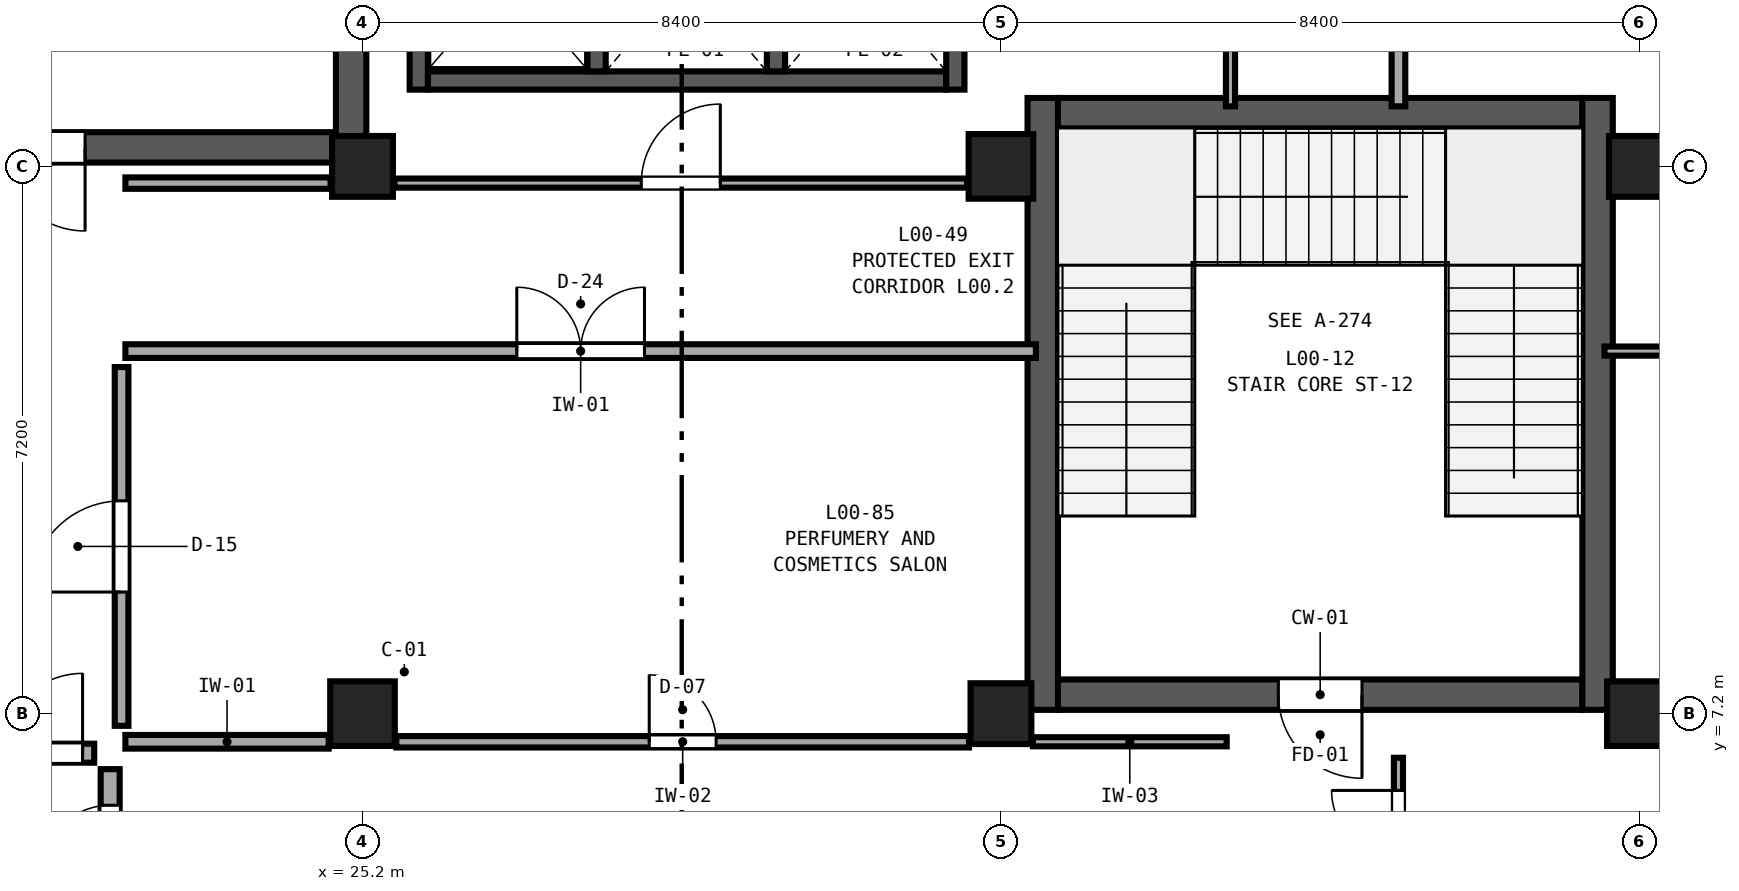
"""IFC4 building model, lengths in metres.
Left out: names, types, materials, properties, quantities, classifications, styles, units other than length and angle.
Written with IfcOpenShell. Run it as: python <this file> out.ifc"""

import sys

from ifc_helpers import new_model, si_unit, direction, frame, frame_2d, origin, origin_2d, place, context, subcontext, project, spatial, rectangle, extrude, element, fill, save


model = new_model("IFC4")
c1 = context("Model", 3, precision=1e-05, world=origin(), true_north=direction((0.0, 1.0)))
c2 = subcontext(c1, "Body", "Model", "MODEL_VIEW")
j1 = project(units=[si_unit("LENGTHUNIT", "METRE"), si_unit("PLANEANGLEUNIT", "RADIAN")], contexts=[c1])
p1 = place(None, origin())
s1 = spatial("IfcSite", under=j1, at=p1, CompositionType="ELEMENT")
p2 = place(p1, origin())
s2 = spatial("IfcBuilding", under=s1, at=p2, CompositionType="ELEMENT")
p3 = place(p2, origin())
s3 = spatial("IfcBuildingStorey", under=s2, at=p3, CompositionType="ELEMENT", Elevation=0.0)
p4 = place(p3, frame((25.2, 7.2, 0.0), z_axis=(0.0, 0.0, 1.0), x_axis=(1.0, 0.0, 0.0)))
e1 = element("IfcColumn", 1, at=p4, inside=s3, PredefinedType="COLUMN", context=c2, shape_type="SweptSolid", body=[
    extrude(rectangle(XDim=0.85, YDim=0.85, at=origin_2d()), origin(), (0.0, 0.0, 1.0), 5.4),
])
for number, where, z_axis, x_axis in (
    (2, (25.2, 14.4, 0.0), (0.0, 0.0, 1.0), (1.0, 0.0, 0.0)),
    (3, (33.6, 7.2, 0.0), (0.0, 0.0, 1.0), (1.0, 0.0, 0.0)),
):
    element("IfcColumn", number, at=place(p3, frame(where, z_axis=z_axis, x_axis=x_axis)), inside=s3, PredefinedType="COLUMN", context=c2, shape_type="SweptSolid", body=[
        extrude(rectangle(XDim=0.8, YDim=0.8, at=origin_2d()), origin(), (0.0, 0.0, 1.0), 5.4),
    ])
for number, where, z_axis, x_axis in (
    (4, (33.6, 14.4, 0.0), (0.0, 0.0, 1.0), (1.0, 0.0, 0.0)),
    (5, (42.0, 7.2, 0.0), (0.0, 0.0, 1.0), (1.0, 0.0, 0.0)),
):
    element("IfcColumn", number, at=place(p3, frame(where, z_axis=z_axis, x_axis=x_axis)), inside=s3, PredefinedType="COLUMN", context=c2, shape_type="SweptSolid", body=[
        extrude(rectangle(XDim=0.85, YDim=0.85, at=origin_2d()), origin(), (0.0, 0.0, 1.0), 5.4),
    ])
p5 = place(p3, frame((42.0, 14.4, 0.0), z_axis=(0.0, 0.0, 1.0), x_axis=(1.0, 0.0, 0.0)))
e6 = element("IfcColumn", 6, at=p5, inside=s3, PredefinedType="COLUMN", context=c2, shape_type="SweptSolid", body=[
    extrude(rectangle(XDim=0.8, YDim=0.8, at=origin_2d()), origin(), (0.0, 0.0, 1.0), 5.4),
])
p6 = place(p3, frame((24.85, 14.65, 0.0), z_axis=(0.0, 0.0, 1.0), x_axis=(-1.0, 0.0, 0.0)))
e7 = element("IfcWall", 7, at=p6, inside=s3, PredefinedType="SHEAR", context=c2, shape_type="SweptSolid", body=[
    extrude(rectangle(XDim=7.7, YDim=0.4, at=frame_2d((3.85, 0.0))), origin(), (0.0, 0.0, 1.0), 5.4),
])
p7 = place(p6, frame((3.3, 0.0, 0.0)))
e8 = element("IfcOpeningElement", 8, at=p7, cuts=e7, PredefinedType="OPENING", context=c2, shape_type="SweptSolid", body=[
    extrude(rectangle(XDim=1.1, YDim=2.2, at=frame_2d((0.55, 1.1))), frame((0.0, 0.22, 0.0), z_axis=(0.0, -1.0, 0.0), x_axis=(1.0, 0.0, 0.0)), (0.0, 0.0, 1.0), 0.44),
])
p8 = place(p3, frame((25.05, 14.45, 0.0), z_axis=(0.0, 0.0, 1.0), x_axis=(0.0, 1.0, 0.0)))
e9 = element("IfcWall", 9, at=p8, inside=s3, PredefinedType="SHEAR", context=c2, shape_type="SweptSolid", body=[
    extrude(rectangle(XDim=8.45, YDim=0.4, at=frame_2d((4.225, 0.0))), origin(), (0.0, 0.0, 1.0), 5.4),
])
p9 = place(p3, frame((41.25, 7.45, 0.0), z_axis=(0.0, 0.0, 1.0), x_axis=(-1.0, 0.0, 0.0)))
e10 = element("IfcWall", 10, at=p9, inside=s3, PredefinedType="SHEAR", context=c2, shape_type="SweptSolid", body=[
    extrude(rectangle(XDim=6.9, YDim=0.4, at=frame_2d((3.45, 0.0))), origin(), (0.0, 0.0, 1.0), 5.4),
])
p10 = place(p9, frame((2.9, 0.0, 0.0)))
e11 = element("IfcOpeningElement", 11, at=p10, cuts=e10, PredefinedType="OPENING", context=c2, shape_type="SweptSolid", body=[
    extrude(rectangle(XDim=1.1, YDim=2.2, at=frame_2d((0.55, 1.1))), frame((0.0, 0.22, 0.0), z_axis=(0.0, -1.0, 0.0), x_axis=(1.0, 0.0, 0.0)), (0.0, 0.0, 1.0), 0.44),
])
p11 = place(p3, frame((34.35, 15.1, 0.0), z_axis=(0.0, 0.0, 1.0), x_axis=(1.0, 0.0, 0.0)))
e12 = element("IfcWall", 12, at=p11, inside=s3, PredefinedType="SHEAR", context=c2, shape_type="SweptSolid", body=[
    extrude(rectangle(XDim=6.9, YDim=0.4, at=frame_2d((3.45, 0.0))), origin(), (0.0, 0.0, 1.0), 5.4),
])
for number, where, z_axis, x_axis in (
    (13, (34.15, 15.3, 0.0), (0.0, 0.0, 1.0), (0.0, -1.0, 0.0)),
    (14, (41.45, 7.25, 0.0), (0.0, 0.0, 1.0), (0.0, 1.0, 0.0)),
):
    element("IfcWall", number, at=place(p3, frame(where, z_axis=z_axis, x_axis=x_axis)), inside=s3, PredefinedType="SHEAR", context=c2, shape_type="SweptSolid", body=[
        extrude(rectangle(XDim=8.05, YDim=0.4, at=frame_2d((4.025, 0.0))), origin(), (0.0, 0.0, 1.0), 5.4),
    ])
p12 = place(p3, frame((26.06, 15.53, 0.0), z_axis=(0.0, 0.0, 1.0), x_axis=(1.0, 0.0, 0.0)))
e15 = element("IfcWall", 15, at=p12, inside=s3, PredefinedType="SHEAR", context=c2, shape_type="SweptSolid", body=[
    extrude(rectangle(XDim=6.82, YDim=0.24, at=frame_2d((3.41, 0.0))), origin(), (0.0, 0.0, 1.0), 5.08),
])
for number, where, z_axis, x_axis in (
    (16, (25.94, 18.39, 0.0), (0.0, 0.0, 1.0), (0.0, -1.0, 0.0)),
    (17, (33.0, 15.41, 0.0), (0.0, 0.0, 1.0), (0.0, 1.0, 0.0)),
):
    element("IfcWall", number, at=place(p3, frame(where, z_axis=z_axis, x_axis=x_axis)), inside=s3, PredefinedType="SHEAR", context=c2, shape_type="SweptSolid", body=[
        extrude(rectangle(XDim=2.98, YDim=0.24, at=frame_2d((1.49, 0.0))), origin(), (0.0, 0.0, 1.0), 5.08),
    ])
for number, where, z_axis, x_axis in (
    (18, (28.28, 15.65, 0.0), (0.0, 0.0, 1.0), (0.0, 1.0, 0.0)),
    (19, (30.64, 15.65, 0.0), (0.0, 0.0, 1.0), (0.0, 1.0, 0.0)),
):
    element("IfcWall", number, at=place(p3, frame(where, z_axis=z_axis, x_axis=x_axis)), inside=s3, PredefinedType="SHEAR", context=c2, shape_type="SweptSolid", body=[
        extrude(rectangle(XDim=2.5, YDim=0.24, at=frame_2d((1.25, 0.0))), origin(), (0.0, 0.0, 1.0), 5.08),
    ])
p13 = place(p3, frame((41.54, 11.97, 0.0), z_axis=(0.0, 0.0, 1.0), x_axis=(1.0, 0.0, 0.0)))
e20 = element("IfcWall", 20, at=p13, inside=s3, PredefinedType="PARTITIONING", context=c2, shape_type="SweptSolid", body=[
    extrude(rectangle(XDim=14.67, YDim=0.12, at=frame_2d((7.335, 0.0))), origin(), (0.0, 0.0, 1.0), 5.08),
])
p14 = place(p13, frame((5.725, 0.0, 0.0)))
e21 = element("IfcOpeningElement", 21, at=p14, cuts=e20, PredefinedType="OPENING", context=c2, shape_type="SweptSolid", body=[
    extrude(rectangle(XDim=1.04, YDim=2.05, at=frame_2d((0.52, 1.025))), frame((0.0, 0.08, 0.0), z_axis=(0.0, -1.0, 0.0), x_axis=(1.0, 0.0, 0.0)), (0.0, 0.0, 1.0), 0.16),
])
p15 = place(p3, frame((22.08, 6.83, 0.0), z_axis=(0.0, 0.0, 1.0), x_axis=(1.0, 0.0, 0.0)))
e22 = element("IfcWall", 22, at=p15, inside=s3, PredefinedType="PARTITIONING", context=c2, shape_type="SweptSolid", body=[
    extrude(rectangle(XDim=2.675, YDim=0.18, at=frame_2d((1.337, 0.0))), origin(), (0.0, 0.0, 1.0), 4.58),
])
p16 = place(p3, frame((25.645, 6.83, 0.0), z_axis=(0.0, 0.0, 1.0), x_axis=(1.0, 0.0, 0.0)))
e23 = element("IfcWall", 23, at=p16, inside=s3, PredefinedType="PARTITIONING", context=c2, shape_type="SweptSolid", body=[
    extrude(rectangle(XDim=7.535, YDim=0.15, at=frame_2d((3.768, 0.0))), origin(), (0.0, 0.0, 1.0), 4.58),
])
p17 = place(p16, frame((3.327, 0.0, 0.0)))
e24 = element("IfcOpeningElement", 24, at=p17, cuts=e23, PredefinedType="OPENING", context=c2, shape_type="SweptSolid", body=[
    extrude(rectangle(XDim=0.88, YDim=2.13, at=frame_2d((0.44, 1.065))), frame((0.0, 0.095, 0.0), z_axis=(0.0, -1.0, 0.0), x_axis=(1.0, 0.0, 0.0)), (0.0, 0.0, 1.0), 0.19),
])
p18 = place(p3, frame((34.02, 6.83, 0.0), z_axis=(0.0, 0.0, 1.0), x_axis=(1.0, 0.0, 0.0)))
e25 = element("IfcWall", 25, at=p18, inside=s3, PredefinedType="PARTITIONING", context=c2, shape_type="SweptSolid", body=[
    extrude(rectangle(XDim=2.55, YDim=0.12, at=frame_2d((1.275, 0.0))), origin(), (0.0, 0.0, 1.0), 4.58),
])
p19 = place(p3, frame((22.08, 11.97, 0.0), z_axis=(0.0, 0.0, 1.0), x_axis=(1.0, 0.0, 0.0)))
e26 = element("IfcWall", 26, at=p19, inside=s3, PredefinedType="PARTITIONING", context=c2, shape_type="SweptSolid", body=[
    extrude(rectangle(XDim=11.98, YDim=0.18, at=frame_2d((5.99, 0.0))), origin(), (0.0, 0.0, 1.0), 5.08),
])
p20 = place(p19, frame((5.15, 0.0, 0.0)))
e27 = element("IfcOpeningElement", 27, at=p20, cuts=e26, PredefinedType="OPENING", context=c2, shape_type="SweptSolid", body=[
    extrude(rectangle(XDim=1.68, YDim=2.29, at=frame_2d((0.84, 1.145))), frame((0.0, 0.11, 0.0), z_axis=(0.0, -1.0, 0.0), x_axis=(1.0, 0.0, 0.0)), (0.0, 0.0, 1.0), 0.22),
])
p21 = place(p3, frame((22.08, 14.18, 0.0), z_axis=(0.0, 0.0, 1.0), x_axis=(1.0, 0.0, 0.0)))
e28 = element("IfcWall", 28, at=p21, inside=s3, PredefinedType="PARTITIONING", context=c2, shape_type="SweptSolid", body=[
    extrude(rectangle(XDim=2.7, YDim=0.15, at=frame_2d((1.35, 0.0))), origin(), (0.0, 0.0, 1.0), 4.58),
])
p22 = place(p3, frame((25.62, 14.18, 0.0), z_axis=(0.0, 0.0, 1.0), x_axis=(1.0, 0.0, 0.0)))
e29 = element("IfcWall", 29, at=p22, inside=s3, PredefinedType="PARTITIONING", context=c2, shape_type="SweptSolid", body=[
    extrude(rectangle(XDim=7.535, YDim=0.12, at=frame_2d((3.768, 0.0))), origin(), (0.0, 0.0, 1.0), 4.58),
])
p23 = place(p22, frame((3.248, 0.0, 0.0)))
e30 = element("IfcOpeningElement", 30, at=p23, cuts=e29, PredefinedType="OPENING", context=c2, shape_type="SweptSolid", body=[
    extrude(rectangle(XDim=1.04, YDim=2.37, at=frame_2d((0.52, 1.185))), frame((0.0, 0.08, 0.0), z_axis=(0.0, -1.0, 0.0), x_axis=(1.0, 0.0, 0.0)), (0.0, 0.0, 1.0), 0.16),
])
p24 = place(p3, frame((22.03, 7.04, 0.0), z_axis=(0.0, 0.0, 1.0), x_axis=(0.0, 1.0, 0.0)))
e31 = element("IfcWall", 31, at=p24, inside=s3, PredefinedType="PARTITIONING", context=c2, shape_type="SweptSolid", body=[
    extrude(rectangle(XDim=4.72, YDim=0.18, at=frame_2d((2.36, 0.0))), origin(), (0.0, 0.0, 1.0), 5.08),
])
p25 = place(p24, frame((1.76, 0.0, 0.0)))
e32 = element("IfcOpeningElement", 32, at=p25, cuts=e31, PredefinedType="OPENING", context=c2, shape_type="SweptSolid", body=[
    extrude(rectangle(XDim=1.2, YDim=2.21, at=frame_2d((0.6, 1.105))), frame((0.0, 0.11, 0.0), z_axis=(0.0, -1.0, 0.0), x_axis=(1.0, 0.0, 0.0)), (0.0, 0.0, 1.0), 0.22),
])
p26 = place(p3, frame((38.83, 15.19, 0.0), z_axis=(0.0, 0.0, 1.0), x_axis=(0.0, 1.0, 0.0)))
e33 = element("IfcWall", 33, at=p26, inside=s3, PredefinedType="PARTITIONING", context=c2, shape_type="SweptSolid", body=[
    extrude(rectangle(XDim=3.43, YDim=0.18, at=frame_2d((1.715, 0.0))), origin(), (0.0, 0.0, 1.0), 5.08),
])
p27 = place(p26, frame((1.155, 0.0, 0.0)))
e34 = element("IfcOpeningElement", 34, at=p27, cuts=e33, PredefinedType="OPENING", context=c2, shape_type="SweptSolid", body=[
    extrude(rectangle(XDim=1.68, YDim=2.37, at=frame_2d((0.84, 1.185))), frame((0.0, 0.11, 0.0), z_axis=(0.0, -1.0, 0.0), x_axis=(1.0, 0.0, 0.0)), (0.0, 0.0, 1.0), 0.22),
])
p28 = place(p3, frame((36.62, 15.19, 0.0), z_axis=(0.0, 0.0, 1.0), x_axis=(0.0, 1.0, 0.0)))
e35 = element("IfcWall", 35, at=p28, inside=s3, PredefinedType="PARTITIONING", context=c2, shape_type="SweptSolid", body=[
    extrude(rectangle(XDim=3.27, YDim=0.12, at=frame_2d((1.635, 0.0))), origin(), (0.0, 0.0, 1.0), 5.08),
])
p29 = place(p28, frame((1.155, 0.0, 0.0)))
e36 = element("IfcOpeningElement", 36, at=p29, cuts=e35, PredefinedType="OPENING", context=c2, shape_type="SweptSolid", body=[
    extrude(rectangle(XDim=1.52, YDim=2.45, at=frame_2d((0.76, 1.225))), frame((0.0, 0.08, 0.0), z_axis=(0.0, -1.0, 0.0), x_axis=(1.0, 0.0, 0.0)), (0.0, 0.0, 1.0), 0.16),
])
p30 = place(p3, frame((19.77, 6.68, 0.0), z_axis=(0.0, 0.0, 1.0), x_axis=(1.0, 0.0, 0.0)))
e37 = element("IfcWall", 37, at=p30, inside=s3, PredefinedType="SOLIDWALL", context=c2, shape_type="SweptSolid", body=[
    extrude(rectangle(XDim=1.9, YDim=0.25, at=frame_2d((0.95, 0.0))), origin(), (0.0, 0.0, 1.0), 4.58),
])
p31 = place(p30, frame((0.697, 0.0, 0.0)))
e38 = element("IfcOpeningElement", 38, at=p31, cuts=e37, PredefinedType="OPENING", context=c2, shape_type="SweptSolid", body=[
    extrude(rectangle(XDim=1.05, YDim=2.15, at=frame_2d((0.525, 1.075))), frame((0.0, 0.145, 0.0), z_axis=(0.0, -1.0, 0.0), x_axis=(1.0, 0.0, 0.0)), (0.0, 0.0, 1.0), 0.29),
])
p32 = place(p3, frame((21.88, 4.62, 0.0), z_axis=(0.0, 0.0, 1.0), x_axis=(0.0, 1.0, 0.0)))
e39 = element("IfcWall", 39, at=p32, inside=s3, PredefinedType="SOLIDWALL", context=c2, shape_type="SweptSolid", body=[
    extrude(rectangle(XDim=1.85, YDim=0.25, at=frame_2d((0.925, 0.0))), origin(), (0.0, 0.0, 1.0), 5.08),
])
p33 = place(p32, frame((0.475, 0.0, 0.0)))
e40 = element("IfcOpeningElement", 40, at=p33, cuts=e39, PredefinedType="OPENING", context=c2, shape_type="SweptSolid", body=[
    extrude(rectangle(XDim=0.9, YDim=2.1, at=frame_2d((0.45, 1.05))), frame((0.0, 0.145, 0.0), z_axis=(0.0, -1.0, 0.0), x_axis=(1.0, 0.0, 0.0)), (0.0, 0.0, 1.0), 0.29),
])
p34 = place(p3, frame((38.83, 4.88, 0.0), z_axis=(0.0, 0.0, 1.0), x_axis=(0.0, 1.0, 0.0)))
e41 = element("IfcWall", 41, at=p34, inside=s3, PredefinedType="PARTITIONING", context=c2, shape_type="SweptSolid", body=[
    extrude(rectangle(XDim=1.74, YDim=0.12, at=frame_2d((0.87, 0.0))), origin(), (0.0, 0.0, 1.0), 5.08),
])
p35 = place(p34, frame((0.43, 0.0, 0.0)))
e42 = element("IfcOpeningElement", 42, at=p35, cuts=e41, PredefinedType="OPENING", context=c2, shape_type="SweptSolid", body=[
    extrude(rectangle(XDim=0.88, YDim=2.05, at=frame_2d((0.44, 1.025))), frame((0.0, 0.08, 0.0), z_axis=(0.0, -1.0, 0.0), x_axis=(1.0, 0.0, 0.0)), (0.0, 0.0, 1.0), 0.16),
])
p36 = place(p7, origin())
e43 = element("IfcDoor", 43, at=p36, inside=s3, OperationType="SINGLE_SWING_LEFT", PredefinedType="DOOR", context=c2, shape_type="SweptSolid", body=[
    extrude(rectangle(XDim=1.1, YDim=2.2, at=frame_2d((0.55, 1.1))), frame((0.0, 0.025, 0.0), z_axis=(0.0, -1.0, 0.0), x_axis=(1.0, 0.0, 0.0)), (0.0, 0.0, 1.0), 0.05),
])
fill(e8, e43)
p37 = place(p10, origin())
e44 = element("IfcDoor", 44, at=p37, inside=s3, OperationType="SINGLE_SWING_LEFT", PredefinedType="DOOR", context=c2, shape_type="SweptSolid", body=[
    extrude(rectangle(XDim=1.1, YDim=2.2, at=frame_2d((0.55, 1.1))), frame((0.0, 0.025, 0.0), z_axis=(0.0, -1.0, 0.0), x_axis=(1.0, 0.0, 0.0)), (0.0, 0.0, 1.0), 0.05),
])
fill(e11, e44)
p38 = place(p17, origin())
e45 = element("IfcDoor", 45, at=p38, inside=s3, OperationType="SINGLE_SWING_LEFT", PredefinedType="DOOR", context=c2, shape_type="SweptSolid", body=[
    extrude(rectangle(XDim=0.88, YDim=2.13, at=frame_2d((0.44, 1.065))), frame((0.0, 0.025, 0.0), z_axis=(0.0, -1.0, 0.0), x_axis=(1.0, 0.0, 0.0)), (0.0, 0.0, 1.0), 0.05),
])
fill(e24, e45)
p39 = place(p20, frame((1.68, 0.0, 0.0), z_axis=(0.0, 0.0, 1.0), x_axis=(-1.0, 0.0, 0.0)))
e46 = element("IfcDoor", 46, at=p39, inside=s3, OperationType="DOUBLE_DOOR_SINGLE_SWING", PredefinedType="DOOR", context=c2, shape_type="SweptSolid", body=[
    extrude(rectangle(XDim=1.68, YDim=2.29, at=frame_2d((0.84, 1.145))), frame((0.0, 0.025, 0.0), z_axis=(0.0, -1.0, 0.0), x_axis=(1.0, 0.0, 0.0)), (0.0, 0.0, 1.0), 0.05),
])
fill(e27, e46)
p40 = place(p23, origin())
e47 = element("IfcDoor", 47, at=p40, inside=s3, OperationType="SINGLE_SWING_RIGHT", PredefinedType="DOOR", context=c2, shape_type="SweptSolid", body=[
    extrude(rectangle(XDim=1.04, YDim=2.37, at=frame_2d((0.52, 1.185))), frame((0.0, 0.025, 0.0), z_axis=(0.0, -1.0, 0.0), x_axis=(1.0, 0.0, 0.0)), (0.0, 0.0, 1.0), 0.05),
])
fill(e30, e47)
p41 = place(p25, frame((1.2, 0.0, 0.0), z_axis=(0.0, 0.0, 1.0), x_axis=(-1.0, 0.0, 0.0)))
e48 = element("IfcDoor", 48, at=p41, inside=s3, OperationType="SINGLE_SWING_LEFT", PredefinedType="DOOR", context=c2, shape_type="SweptSolid", body=[
    extrude(rectangle(XDim=1.2, YDim=2.21, at=frame_2d((0.6, 1.105))), frame((0.0, 0.025, 0.0), z_axis=(0.0, -1.0, 0.0), x_axis=(1.0, 0.0, 0.0)), (0.0, 0.0, 1.0), 0.05),
])
fill(e32, e48)
p42 = place(p31, frame((1.05, 0.0, 0.0), z_axis=(0.0, 0.0, 1.0), x_axis=(-1.0, 0.0, 0.0)))
e49 = element("IfcDoor", 49, at=p42, inside=s3, OperationType="SINGLE_SWING_RIGHT", PredefinedType="DOOR", context=c2, shape_type="SweptSolid", body=[
    extrude(rectangle(XDim=1.05, YDim=2.15, at=frame_2d((0.525, 1.075))), frame((0.0, 0.025, 0.0), z_axis=(0.0, -1.0, 0.0), x_axis=(1.0, 0.0, 0.0)), (0.0, 0.0, 1.0), 0.05),
])
fill(e38, e49)
p43 = place(p33, origin())
e50 = element("IfcDoor", 50, at=p43, inside=s3, OperationType="SINGLE_SWING_LEFT", PredefinedType="DOOR", context=c2, shape_type="SweptSolid", body=[
    extrude(rectangle(XDim=0.9, YDim=2.1, at=frame_2d((0.45, 1.05))), frame((0.0, 0.025, 0.0), z_axis=(0.0, -1.0, 0.0), x_axis=(1.0, 0.0, 0.0)), (0.0, 0.0, 1.0), 0.05),
])
fill(e40, e50)
p44 = place(p35, frame((0.88, 0.0, 0.0), z_axis=(0.0, 0.0, 1.0), x_axis=(-1.0, 0.0, 0.0)))
e51 = element("IfcDoor", 51, at=p44, inside=s3, OperationType="SINGLE_SWING_RIGHT", PredefinedType="DOOR", context=c2, shape_type="SweptSolid", body=[
    extrude(rectangle(XDim=0.88, YDim=2.05, at=frame_2d((0.44, 1.025))), frame((0.0, 0.025, 0.0), z_axis=(0.0, -1.0, 0.0), x_axis=(1.0, 0.0, 0.0)), (0.0, 0.0, 1.0), 0.05),
])
fill(e42, e51)
save(model, sys.argv[1])
